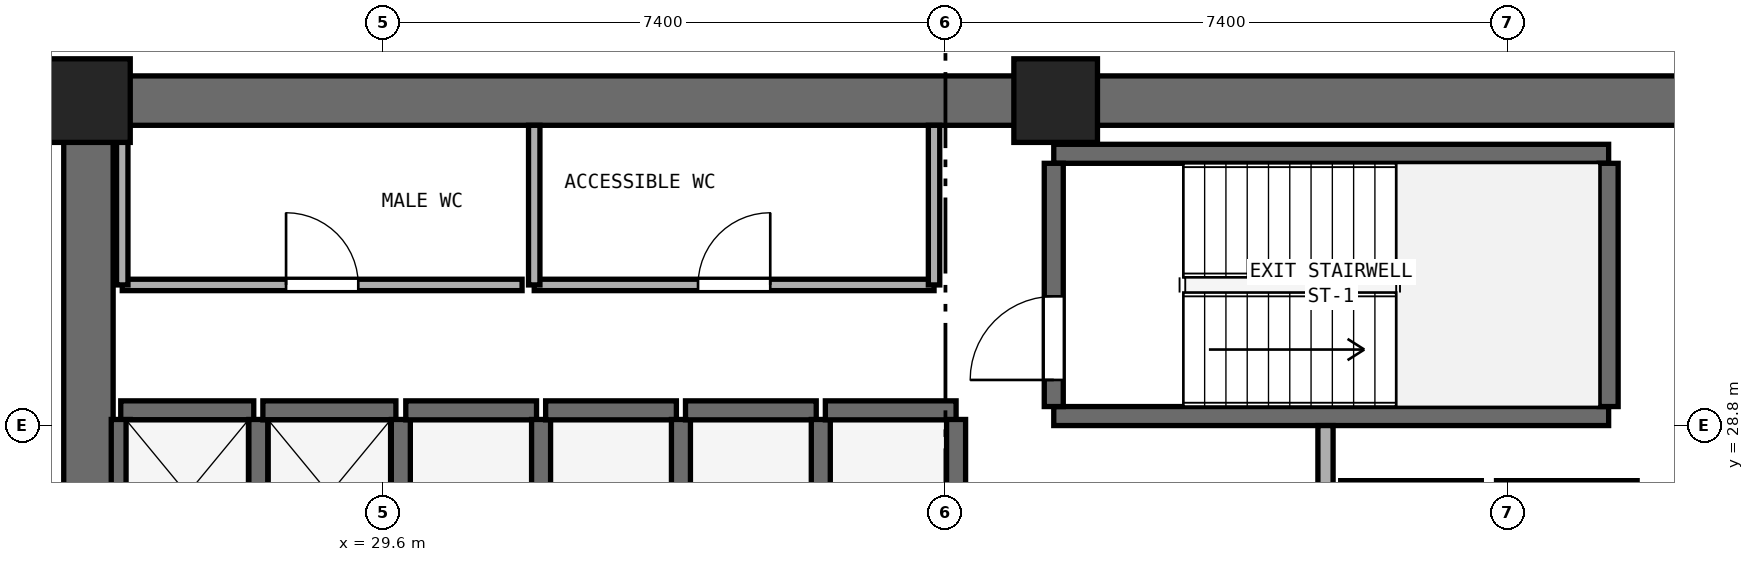
"""IFC4 building model, lengths in metres.
Left out: names, types, materials, properties, quantities, classifications, styles, units other than length and angle.
Written with IfcOpenShell. Run it as: python <this file> out.ifc"""

import sys

from ifc_helpers import new_model, si_unit, direction, frame, frame_2d, origin, origin_2d, place, context, subcontext, project, spatial, rectangle, extrude, element, fill, save


model = new_model("IFC4")
c1 = context("Model", 3, precision=1e-05, world=origin(), true_north=direction((0.0, 1.0)))
c2 = subcontext(c1, "Body", "Model", "MODEL_VIEW")
j1 = project(units=[si_unit("LENGTHUNIT", "METRE"), si_unit("PLANEANGLEUNIT", "RADIAN")], contexts=[c1])
p1 = place(None, origin())
s1 = spatial("IfcSite", under=j1, at=p1, CompositionType="ELEMENT")
p2 = place(p1, origin())
s2 = spatial("IfcBuilding", under=s1, at=p2, CompositionType="ELEMENT")
p3 = place(p2, frame((0.0, 0.0, 74.4)))
s3 = spatial("IfcBuildingStorey", under=s2, at=p3, CompositionType="ELEMENT", Elevation=74.4)
p4 = place(p3, frame((25.4, 33.075, 0.0), z_axis=(0.0, 0.0, 1.0), x_axis=(1.0, 0.0, 0.0)))
e1 = element("IfcWall", 1, at=p4, inside=s3, PredefinedType="SHEAR", context=c2, shape_type="SweptSolid", body=[
    extrude(rectangle(XDim=23.2, YDim=0.65, at=frame_2d((11.6, 0.0))), origin(), (0.0, 0.0, 1.0), 3.525),
])
p5 = place(p3, frame((25.725, 17.65, 0.0), z_axis=(0.0, 0.0, 1.0), x_axis=(0.0, 1.0, 0.0)))
e2 = element("IfcWall", 2, at=p5, inside=s3, PredefinedType="SHEAR", context=c2, shape_type="SweptSolid", body=[
    extrude(rectangle(XDim=15.1, YDim=0.65, at=frame_2d((7.55, 0.0))), origin(), (0.0, 0.0, 1.0), 3.525),
])
p6 = place(p5, frame((6.8, 0.0, 0.0)))
e3 = element("IfcOpeningElement", 3, at=p6, cuts=e2, PredefinedType="OPENING", context=c2, shape_type="SweptSolid", body=[
    extrude(rectangle(XDim=1.5, YDim=2.15, at=frame_2d((0.75, 1.075))), frame((0.0, 0.335, 0.0), z_axis=(0.0, -1.0, 0.0), x_axis=(1.0, 0.0, 0.0)), (0.0, 0.0, 1.0), 0.67),
])
for number, where, z_axis, x_axis in (
    (4, (38.45, 33.075, 0.0), (0.0, 0.0, 1.0), (1.0, 0.0, 0.0)),
    (5, (25.725, 33.075, 0.0), (0.0, 0.0, 1.0), (1.0, 0.0, 0.0)),
):
    element("IfcColumn", number, at=place(p3, frame(where, z_axis=z_axis, x_axis=x_axis)), inside=s3, PredefinedType="PILASTER", context=c2, shape_type="SweptSolid", body=[
        extrude(rectangle(XDim=1.1, YDim=1.1, at=origin_2d()), origin(), (0.0, 0.0, 1.0), 3.8),
    ])
for number, where, z_axis, x_axis in (
    (6, (38.425, 28.925, 0.0), (0.0, 0.0, 1.0), (1.0, 0.0, 0.0)),
    (7, (38.425, 32.375, 0.0), (0.0, 0.0, 1.0), (1.0, 0.0, 0.0)),
):
    element("IfcWall", number, at=place(p3, frame(where, z_axis=z_axis, x_axis=x_axis)), inside=s3, PredefinedType="SHEAR", context=c2, shape_type="SweptSolid", body=[
        extrude(rectangle(XDim=7.3, YDim=0.25, at=frame_2d((3.65, 0.0))), origin(), (0.0, 0.0, 1.0), 3.525),
    ])
p7 = place(p3, frame((38.425, 29.05, 0.0), z_axis=(0.0, 0.0, 1.0), x_axis=(0.0, 1.0, 0.0)))
e8 = element("IfcWall", 8, at=p7, inside=s3, PredefinedType="SHEAR", context=c2, shape_type="SweptSolid", body=[
    extrude(rectangle(XDim=3.2, YDim=0.25, at=frame_2d((1.6, 0.0))), origin(), (0.0, 0.0, 1.0), 3.525),
])
p8 = place(p7, frame((0.35, 0.0, 0.0)))
e9 = element("IfcOpeningElement", 9, at=p8, cuts=e8, PredefinedType="OPENING", context=c2, shape_type="SweptSolid", body=[
    extrude(rectangle(XDim=1.1, YDim=2.15, at=frame_2d((0.55, 1.075))), frame((0.0, 0.135, 0.0), z_axis=(0.0, -1.0, 0.0), x_axis=(1.0, 0.0, 0.0)), (0.0, 0.0, 1.0), 0.27),
])
p9 = place(p3, frame((45.725, 29.05, 0.0), z_axis=(0.0, 0.0, 1.0), x_axis=(0.0, 1.0, 0.0)))
e10 = element("IfcWall", 10, at=p9, inside=s3, PredefinedType="SHEAR", context=c2, shape_type="SweptSolid", body=[
    extrude(rectangle(XDim=3.2, YDim=0.25, at=frame_2d((1.6, 0.0))), origin(), (0.0, 0.0, 1.0), 3.525),
])
p10 = place(p3, frame((26.15, 29.0, 0.0), z_axis=(0.0, 0.0, 1.0), x_axis=(1.0, 0.0, 0.0)))
e11 = element("IfcWall", 11, at=p10, inside=s3, PredefinedType="SHEAR", context=c2, shape_type="SweptSolid", body=[
    extrude(rectangle(XDim=1.75, YDim=0.25, at=frame_2d((0.875, 0.0))), origin(), (0.0, 0.0, 1.0), 3.525),
])
for number, where, z_axis, x_axis in (
    (12, (26.15, 26.92, 0.0), (0.0, 0.0, 1.0), (0.0, 1.0, 0.0)),
    (13, (27.96, 26.92, 0.0), (0.0, 0.0, 1.0), (0.0, 1.0, 0.0)),
):
    element("IfcWall", number, at=place(p3, frame(where, z_axis=z_axis, x_axis=x_axis)), inside=s3, PredefinedType="SHEAR", context=c2, shape_type="SweptSolid", body=[
        extrude(rectangle(XDim=1.96, YDim=0.25, at=frame_2d((0.98, 0.0))), origin(), (0.0, 0.0, 1.0), 3.525),
    ])
p11 = place(p3, frame((28.02, 29.0, 0.0), z_axis=(0.0, 0.0, 1.0), x_axis=(1.0, 0.0, 0.0)))
e14 = element("IfcWall", 14, at=p11, inside=s3, PredefinedType="SHEAR", context=c2, shape_type="SweptSolid", body=[
    extrude(rectangle(XDim=1.75, YDim=0.25, at=frame_2d((0.875, 0.0))), origin(), (0.0, 0.0, 1.0), 3.525),
])
p12 = place(p3, frame((29.835, 26.92, 0.0), z_axis=(0.0, 0.0, 1.0), x_axis=(0.0, 1.0, 0.0)))
e15 = element("IfcWall", 15, at=p12, inside=s3, PredefinedType="SHEAR", context=c2, shape_type="SweptSolid", body=[
    extrude(rectangle(XDim=1.96, YDim=0.25, at=frame_2d((0.98, 0.0))), origin(), (0.0, 0.0, 1.0), 3.525),
])
p13 = place(p3, frame((29.9, 29.0, 0.0), z_axis=(0.0, 0.0, 1.0), x_axis=(1.0, 0.0, 0.0)))
e16 = element("IfcWall", 16, at=p13, inside=s3, PredefinedType="SHEAR", context=c2, shape_type="SweptSolid", body=[
    extrude(rectangle(XDim=1.72, YDim=0.25, at=frame_2d((0.86, 0.0))), origin(), (0.0, 0.0, 1.0), 3.525),
])
p14 = place(p3, frame((31.68, 26.92, 0.0), z_axis=(0.0, 0.0, 1.0), x_axis=(0.0, 1.0, 0.0)))
e17 = element("IfcWall", 17, at=p14, inside=s3, PredefinedType="SHEAR", context=c2, shape_type="SweptSolid", body=[
    extrude(rectangle(XDim=1.96, YDim=0.25, at=frame_2d((0.98, 0.0))), origin(), (0.0, 0.0, 1.0), 3.525),
])
p15 = place(p3, frame((31.74, 29.0, 0.0), z_axis=(0.0, 0.0, 1.0), x_axis=(1.0, 0.0, 0.0)))
e18 = element("IfcWall", 18, at=p15, inside=s3, PredefinedType="SHEAR", context=c2, shape_type="SweptSolid", body=[
    extrude(rectangle(XDim=1.72, YDim=0.25, at=frame_2d((0.86, 0.0))), origin(), (0.0, 0.0, 1.0), 3.525),
])
p16 = place(p3, frame((33.52, 26.92, 0.0), z_axis=(0.0, 0.0, 1.0), x_axis=(0.0, 1.0, 0.0)))
e19 = element("IfcWall", 19, at=p16, inside=s3, PredefinedType="SHEAR", context=c2, shape_type="SweptSolid", body=[
    extrude(rectangle(XDim=1.96, YDim=0.25, at=frame_2d((0.98, 0.0))), origin(), (0.0, 0.0, 1.0), 3.525),
])
p17 = place(p3, frame((33.58, 29.0, 0.0), z_axis=(0.0, 0.0, 1.0), x_axis=(1.0, 0.0, 0.0)))
e20 = element("IfcWall", 20, at=p17, inside=s3, PredefinedType="SHEAR", context=c2, shape_type="SweptSolid", body=[
    extrude(rectangle(XDim=1.72, YDim=0.25, at=frame_2d((0.86, 0.0))), origin(), (0.0, 0.0, 1.0), 3.525),
])
p18 = place(p3, frame((35.36, 26.92, 0.0), z_axis=(0.0, 0.0, 1.0), x_axis=(0.0, 1.0, 0.0)))
e21 = element("IfcWall", 21, at=p18, inside=s3, PredefinedType="SHEAR", context=c2, shape_type="SweptSolid", body=[
    extrude(rectangle(XDim=1.96, YDim=0.25, at=frame_2d((0.98, 0.0))), origin(), (0.0, 0.0, 1.0), 3.525),
])
p19 = place(p3, frame((35.42, 29.0, 0.0), z_axis=(0.0, 0.0, 1.0), x_axis=(1.0, 0.0, 0.0)))
e22 = element("IfcWall", 22, at=p19, inside=s3, PredefinedType="SHEAR", context=c2, shape_type="SweptSolid", body=[
    extrude(rectangle(XDim=1.72, YDim=0.25, at=frame_2d((0.86, 0.0))), origin(), (0.0, 0.0, 1.0), 3.525),
])
p20 = place(p3, frame((37.14, 26.92, 0.0), z_axis=(0.0, 0.0, 1.0), x_axis=(0.0, 1.0, 0.0)))
e23 = element("IfcWall", 23, at=p20, inside=s3, PredefinedType="SHEAR", context=c2, shape_type="SweptSolid", body=[
    extrude(rectangle(XDim=1.96, YDim=0.25, at=frame_2d((0.98, 0.0))), origin(), (0.0, 0.0, 1.0), 3.525),
])
for number, where, z_axis, x_axis in (
    (24, (42.2, 27.95, 0.0), (0.0, 0.0, 1.0), (1.0, 0.0, 0.0)),
    (25, (44.25, 27.95, 0.0), (0.0, 0.0, 1.0), (1.0, 0.0, 0.0)),
):
    element("IfcWall", number, at=place(p3, frame(where, z_axis=z_axis, x_axis=x_axis)), inside=s3, PredefinedType="SHEAR", context=c2, shape_type="SweptSolid", body=[
        extrude(rectangle(XDim=1.85, YDim=0.25, at=frame_2d((0.925, 0.0))), origin(), (0.0, 0.0, 1.0), 3.525),
    ])
p21 = place(p3, frame((42.0, 22.75, 0.0), z_axis=(0.0, 0.0, 1.0), x_axis=(0.0, 1.0, 0.0)))
e26 = element("IfcWall", 26, at=p21, inside=s3, PredefinedType="SOLIDWALL", context=c2, shape_type="SweptSolid", body=[
    extrude(rectangle(XDim=6.05, YDim=0.2, at=frame_2d((3.025, 0.0))), origin(), (0.0, 0.0, 1.0), 3.525),
])
p22 = place(p21, frame((0.65, 0.0, 0.0)))
e27 = element("IfcOpeningElement", 27, at=p22, cuts=e26, PredefinedType="OPENING", context=c2, shape_type="SweptSolid", body=[
    extrude(rectangle(XDim=1.2, YDim=2.15, at=frame_2d((0.6, 1.075))), frame((0.0, 0.11, 0.0), z_axis=(0.0, -1.0, 0.0), x_axis=(1.0, 0.0, 0.0)), (0.0, 0.0, 1.0), 0.22),
])
p23 = place(p3, frame((26.17, 30.65, 0.0), z_axis=(0.0, 0.0, 1.0), x_axis=(1.0, 0.0, 0.0)))
e28 = element("IfcWall", 28, at=p23, inside=s3, PredefinedType="PARTITIONING", context=c2, shape_type="SweptSolid", body=[
    extrude(rectangle(XDim=5.26, YDim=0.15, at=frame_2d((2.63, 0.0))), origin(), (0.0, 0.0, 1.0), 3.525),
])
p24 = place(p23, frame((2.155, 0.0, 0.0)))
e29 = element("IfcOpeningElement", 29, at=p24, cuts=e28, PredefinedType="OPENING", context=c2, shape_type="SweptSolid", body=[
    extrude(rectangle(XDim=0.95, YDim=2.1, at=frame_2d((0.475, 1.05))), frame((0.0, 0.085, 0.0), z_axis=(0.0, -1.0, 0.0), x_axis=(1.0, 0.0, 0.0)), (0.0, 0.0, 1.0), 0.17),
])
p25 = place(p3, frame((26.17, 30.65, 0.0), z_axis=(0.0, 0.0, 1.0), x_axis=(0.0, 1.0, 0.0)))
e30 = element("IfcWall", 30, at=p25, inside=s3, PredefinedType="PARTITIONING", context=c2, shape_type="SweptSolid", body=[
    extrude(rectangle(XDim=2.1, YDim=0.15, at=frame_2d((1.05, 0.0))), origin(), (0.0, 0.0, 1.0), 3.525),
])
p26 = place(p3, frame((31.59, 30.65, 0.0), z_axis=(0.0, 0.0, 1.0), x_axis=(1.0, 0.0, 0.0)))
e31 = element("IfcWall", 31, at=p26, inside=s3, PredefinedType="PARTITIONING", context=c2, shape_type="SweptSolid", body=[
    extrude(rectangle(XDim=5.26, YDim=0.15, at=frame_2d((2.63, 0.0))), origin(), (0.0, 0.0, 1.0), 3.525),
])
p27 = place(p26, frame((2.155, 0.0, 0.0)))
e32 = element("IfcOpeningElement", 32, at=p27, cuts=e31, PredefinedType="OPENING", context=c2, shape_type="SweptSolid", body=[
    extrude(rectangle(XDim=0.95, YDim=2.1, at=frame_2d((0.475, 1.05))), frame((0.0, 0.085, 0.0), z_axis=(0.0, -1.0, 0.0), x_axis=(1.0, 0.0, 0.0)), (0.0, 0.0, 1.0), 0.17),
])
for number, where, z_axis, x_axis in (
    (33, (31.59, 30.65, 0.0), (0.0, 0.0, 1.0), (0.0, 1.0, 0.0)),
    (34, (36.85, 30.65, 0.0), (0.0, 0.0, 1.0), (0.0, 1.0, 0.0)),
):
    element("IfcWall", number, at=place(p3, frame(where, z_axis=z_axis, x_axis=x_axis)), inside=s3, PredefinedType="PARTITIONING", context=c2, shape_type="SweptSolid", body=[
        extrude(rectangle(XDim=2.1, YDim=0.15, at=frame_2d((1.05, 0.0))), origin(), (0.0, 0.0, 1.0), 3.525),
    ])
p28 = place(p8, origin())
e35 = element("IfcDoor", 35, at=p28, inside=s3, OperationType="SINGLE_SWING_LEFT", PredefinedType="DOOR", context=c2, shape_type="SweptSolid", body=[
    extrude(rectangle(XDim=1.1, YDim=2.15, at=frame_2d((0.55, 1.075))), frame((0.0, 0.025, 0.0), z_axis=(0.0, -1.0, 0.0), x_axis=(1.0, 0.0, 0.0)), (0.0, 0.0, 1.0), 0.05),
])
fill(e9, e35)
p29 = place(p24, origin())
e36 = element("IfcDoor", 36, at=p29, inside=s3, OperationType="SINGLE_SWING_LEFT", PredefinedType="DOOR", context=c2, shape_type="SweptSolid", body=[
    extrude(rectangle(XDim=0.95, YDim=2.1, at=frame_2d((0.475, 1.05))), frame((0.0, 0.025, 0.0), z_axis=(0.0, -1.0, 0.0), x_axis=(1.0, 0.0, 0.0)), (0.0, 0.0, 1.0), 0.05),
])
fill(e29, e36)
p30 = place(p27, origin())
e37 = element("IfcDoor", 37, at=p30, inside=s3, OperationType="SINGLE_SWING_RIGHT", PredefinedType="DOOR", context=c2, shape_type="SweptSolid", body=[
    extrude(rectangle(XDim=0.95, YDim=2.1, at=frame_2d((0.475, 1.05))), frame((0.0, 0.025, 0.0), z_axis=(0.0, -1.0, 0.0), x_axis=(1.0, 0.0, 0.0)), (0.0, 0.0, 1.0), 0.05),
])
fill(e32, e37)
save(model, sys.argv[1])
